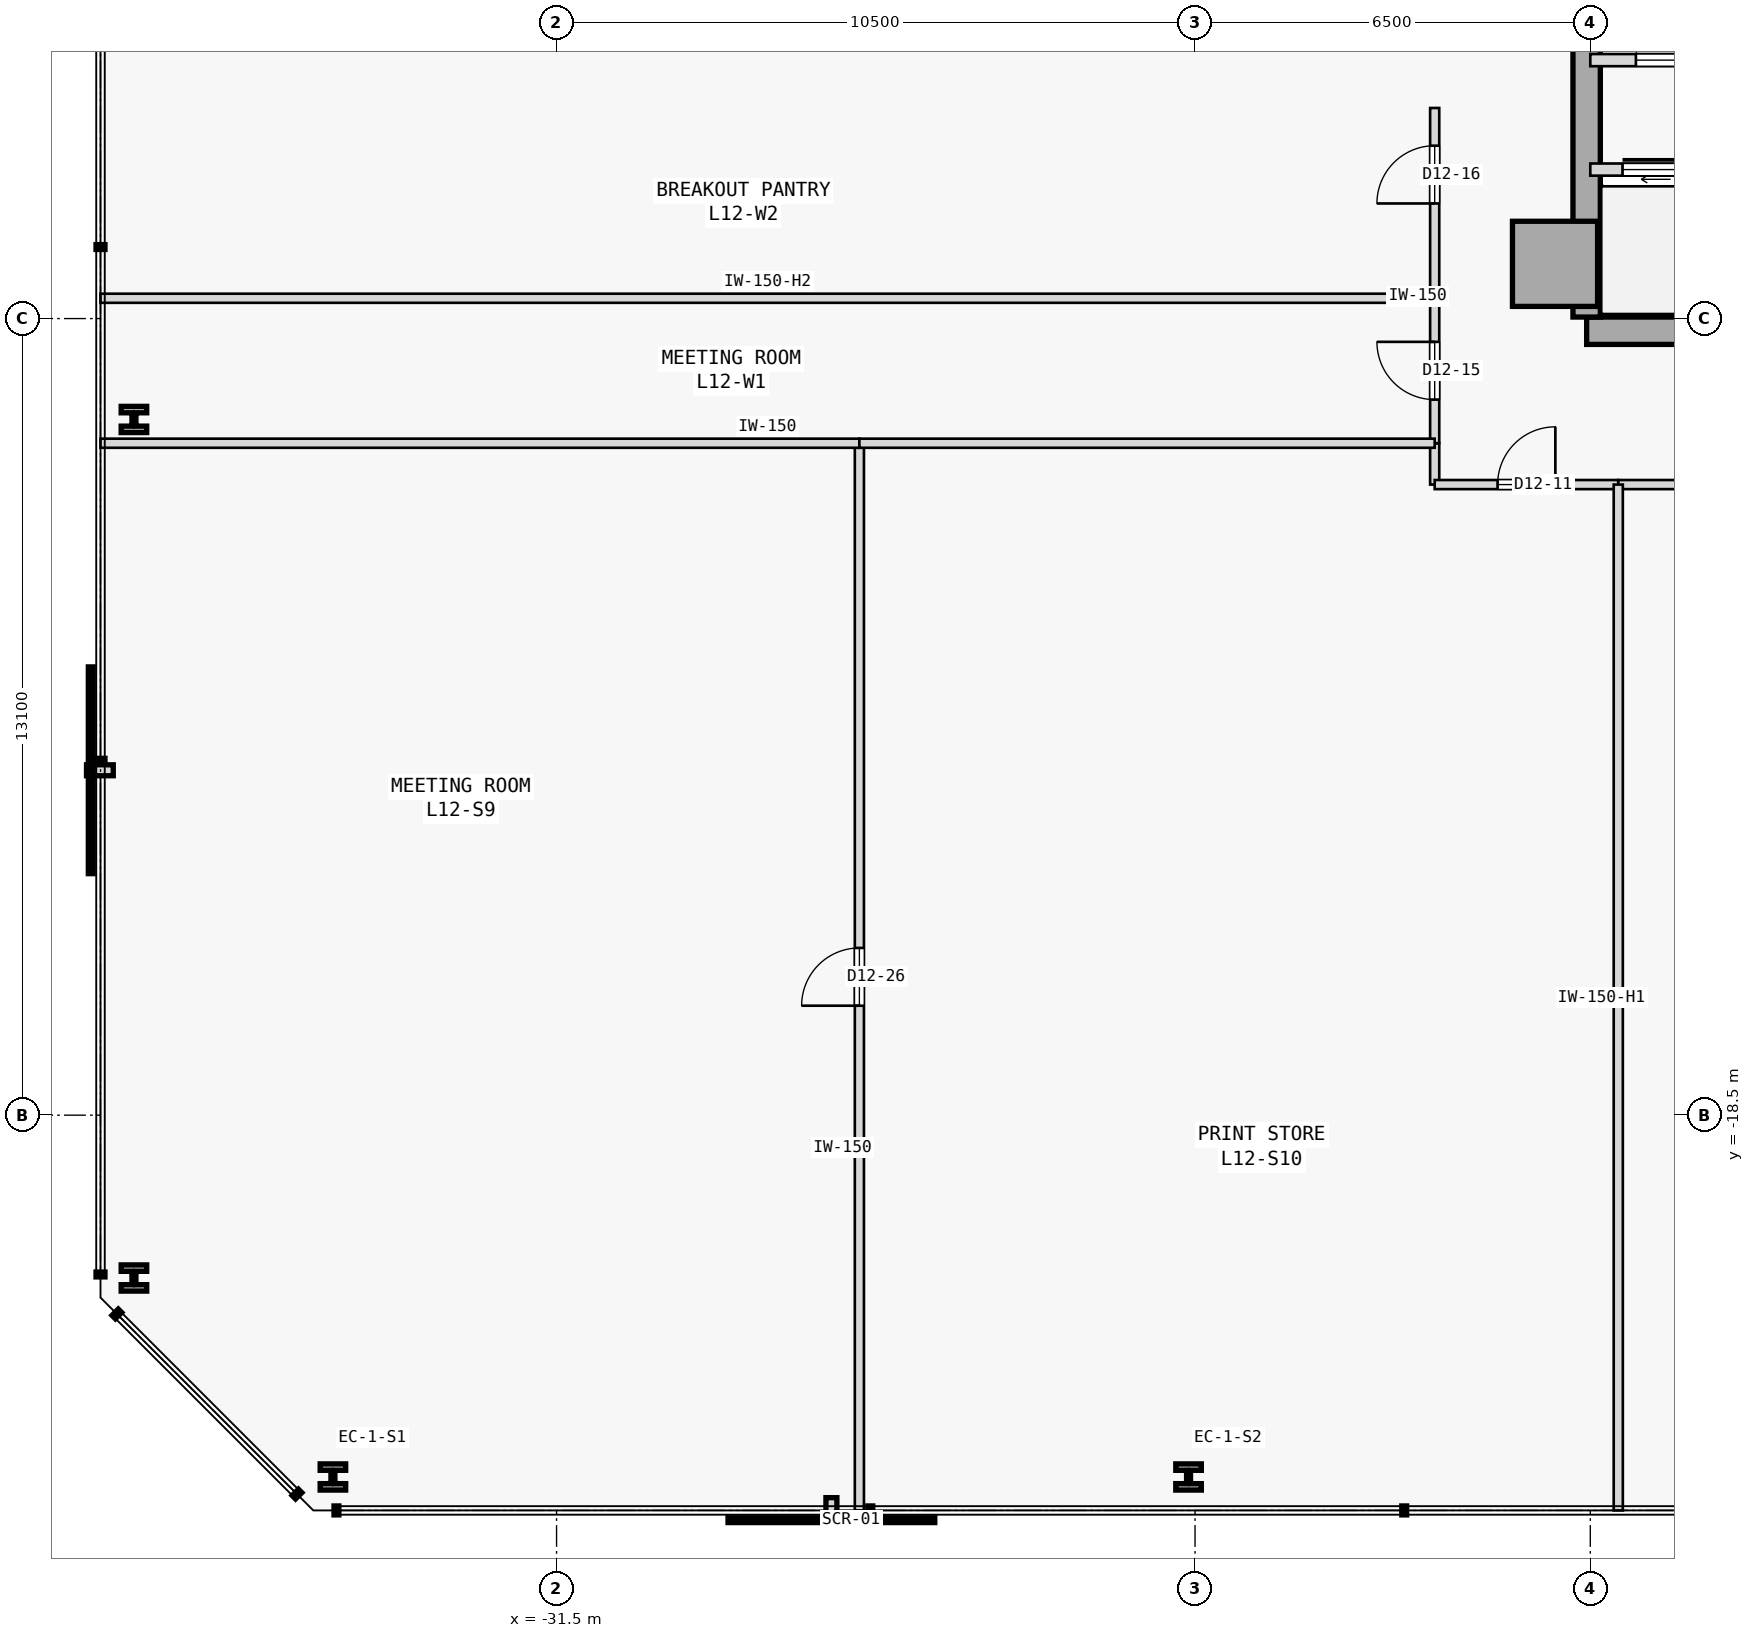
"""IFC4 building model, lengths in metres.
Left out: names, types, materials, properties, quantities, classifications, styles, units other than length and angle.
Written with IfcOpenShell. Run it as: python <this file> out.ifc"""

import sys

from ifc_helpers import new_model, si_unit, direction, frame, frame_2d, origin, origin_2d, place, context, subcontext, project, spatial, rectangle, i_section, extrude, element, fill, save


model = new_model("IFC4")
c1 = context("Model", 3, precision=1e-05, world=origin(), true_north=direction((0.0, 1.0)))
c2 = subcontext(c1, "Body", "Model", "MODEL_VIEW")
j1 = project(units=[si_unit("LENGTHUNIT", "METRE"), si_unit("PLANEANGLEUNIT", "RADIAN")], contexts=[c1])
p1 = place(None, origin())
s1 = spatial("IfcSite", under=j1, at=p1, CompositionType="ELEMENT")
p2 = place(p1, origin())
s2 = spatial("IfcBuilding", under=s1, at=p2, CompositionType="ELEMENT")
p3 = place(p2, frame((0.0, 0.0, 52.2)))
s3 = spatial("IfcBuildingStorey", under=s2, at=p3, CompositionType="ELEMENT", Elevation=52.2)
p4 = place(p3, frame((-15.08, -4.5, 0.0), z_axis=(0.0, 0.0, 1.0), x_axis=(1.0, 0.0, 0.0)))
e1 = element("IfcColumn", 1, at=p4, inside=s3, PredefinedType="COLUMN", context=c2, shape_type="SweptSolid", body=[
    extrude(rectangle(XDim=1.4, YDim=1.4, at=origin_2d()), origin(), (0.0, 0.0, 1.0), 3.8),
])
p5 = place(p3, frame((-14.56, -5.6, 0.0), z_axis=(0.0, 0.0, 1.0), x_axis=(1.0, 0.0, 0.0)))
e2 = element("IfcWall", 2, at=p5, inside=s3, PredefinedType="SHEAR", context=c2, shape_type="SweptSolid", body=[
    extrude(rectangle(XDim=10.86, YDim=0.45, at=frame_2d((5.43, 0.0))), origin(), (0.0, 0.0, 1.0), 3.575),
])
p6 = place(p3, frame((-14.56, -5.375, 0.0), z_axis=(0.0, 0.0, 1.0), x_axis=(0.0, 1.0, 0.0)))
e3 = element("IfcWall", 3, at=p6, inside=s3, PredefinedType="SHEAR", context=c2, shape_type="SweptSolid", body=[
    extrude(rectangle(XDim=10.75, YDim=0.45, at=frame_2d((5.375, 0.0))), origin(), (0.0, 0.0, 1.0), 3.575),
])
for number, where, z_axis, x_axis in (
    (4, (-35.178, -24.45, 0.0), (0.0, 0.0, 1.0), (1.0, 0.0, 0.0)),
    (5, (-21.107, -24.45, 0.0), (0.0, 0.0, 1.0), (1.0, 0.0, 0.0)),
    (6, (-38.45, -7.059, 0.0), (0.0, 0.0, 1.0), (1.0, 0.0, 0.0)),
    (7, (-38.45, -21.178, 0.0), (0.0, 0.0, 1.0), (1.0, 0.0, 0.0)),
):
    element("IfcColumn", number, at=place(p3, frame(where, z_axis=z_axis, x_axis=x_axis)), inside=s3, PredefinedType="COLUMN", context=c2, shape_type="SweptSolid", body=[
        extrude(i_section(OverallWidth=0.42, OverallDepth=0.431, WebThickness=0.065, FlangeThickness=0.106, FilletRadius=0.015, at=origin_2d()), origin(), (0.0, 0.0, 1.0), 3.8),
    ])
p7 = place(p3, frame((-14.5, -1.15, 0.0), z_axis=(0.0, 0.0, 1.0), x_axis=(1.0, 0.0, 0.0)))
e8 = element("IfcWall", 8, at=p7, inside=s3, PredefinedType="STANDARD", context=c2, shape_type="SweptSolid", body=[
    extrude(rectangle(XDim=2.95, YDim=0.2, at=frame_2d((1.475, 0.0))), origin(), (0.0, 0.0, 1.0), 3.575),
])
p8 = place(p7, frame((0.75, 0.0, 0.0)))
e9 = element("IfcOpeningElement", 9, at=p8, cuts=e8, PredefinedType="OPENING", context=c2, shape_type="SweptSolid", body=[
    extrude(rectangle(XDim=1.05, YDim=2.18, at=frame_2d((0.525, 1.09))), frame((0.0, 0.11, 0.0), z_axis=(0.0, -1.0, 0.0), x_axis=(1.0, 0.0, 0.0)), (0.0, 0.0, 1.0), 0.22),
])
p9 = place(p3, frame((-14.5, -2.95, 0.0), z_axis=(0.0, 0.0, 1.0), x_axis=(1.0, 0.0, 0.0)))
e10 = element("IfcWall", 10, at=p9, inside=s3, PredefinedType="STANDARD", context=c2, shape_type="SweptSolid", body=[
    extrude(rectangle(XDim=10.8, YDim=0.2, at=frame_2d((5.4, 0.0))), origin(), (0.0, 0.0, 1.0), 3.575),
])
p10 = place(p9, frame((0.53, 0.0, 0.0)))
e11 = element("IfcOpeningElement", 11, at=p10, cuts=e10, PredefinedType="OPENING", context=c2, shape_type="SweptSolid", body=[
    extrude(rectangle(XDim=1.1, YDim=2.15, at=frame_2d((0.55, 1.075))), frame((0.0, 0.11, 0.0), z_axis=(0.0, -1.0, 0.0), x_axis=(1.0, 0.0, 0.0)), (0.0, 0.0, 1.0), 0.22),
])
p11 = place(p9, frame((2.69, 0.0, 0.0)))
e12 = element("IfcOpeningElement", 12, at=p11, cuts=e10, PredefinedType="OPENING", context=c2, shape_type="SweptSolid", body=[
    extrude(rectangle(XDim=1.1, YDim=2.15, at=frame_2d((0.55, 1.075))), frame((0.0, 0.11, 0.0), z_axis=(0.0, -1.0, 0.0), x_axis=(1.0, 0.0, 0.0)), (0.0, 0.0, 1.0), 0.22),
])
p12 = place(p3, frame((-17.059, -8.13, 0.0), z_axis=(0.0, 0.0, 1.0), x_axis=(0.0, 1.0, 0.0)))
e13 = element("IfcWall", 13, at=p12, inside=s3, PredefinedType="PARTITIONING", context=c2, shape_type="SweptSolid", body=[
    extrude(rectangle(XDim=0.68, YDim=0.15, at=frame_2d((0.34, 0.0))), origin(), (0.0, 0.0, 1.0), 3.575),
])
p13 = place(p3, frame((-17.059, -8.13, 0.0), z_axis=(0.0, 0.0, 1.0), x_axis=(1.0, 0.0, 0.0)))
e14 = element("IfcWall", 14, at=p13, inside=s3, PredefinedType="PARTITIONING", context=c2, shape_type="SweptSolid", body=[
    extrude(rectangle(XDim=3.019, YDim=0.15, at=frame_2d((1.51, 0.0))), origin(), (0.0, 0.0, 1.0), 3.575),
])
p14 = place(p13, frame((1.034, 0.0, 0.0)))
e15 = element("IfcOpeningElement", 15, at=p14, cuts=e14, PredefinedType="OPENING", context=c2, shape_type="SweptSolid", body=[
    extrude(rectangle(XDim=0.95, YDim=2.15, at=frame_2d((0.475, 1.075))), frame((0.0, 0.085, 0.0), z_axis=(0.0, -1.0, 0.0), x_axis=(1.0, 0.0, 0.0)), (0.0, 0.0, 1.0), 0.17),
])
p15 = place(p3, frame((-14.04, -8.13, 0.0), z_axis=(0.0, 0.0, 1.0), x_axis=(1.0, 0.0, 0.0)))
e16 = element("IfcWall", 16, at=p15, inside=s3, PredefinedType="PARTITIONING", context=c2, shape_type="SweptSolid", body=[
    extrude(rectangle(XDim=13.12, YDim=0.15, at=frame_2d((6.56, 0.0))), origin(), (0.0, 0.0, 1.0), 3.575),
])
p16 = place(p3, frame((-17.059, -7.45, 0.0), z_axis=(0.0, 0.0, 1.0), x_axis=(0.0, 1.0, 0.0)))
e17 = element("IfcWall", 17, at=p16, inside=s3, PredefinedType="PARTITIONING", context=c2, shape_type="SweptSolid", body=[
    extrude(rectangle(XDim=2.384, YDim=0.15, at=frame_2d((1.192, 0.0))), origin(), (0.0, 0.0, 1.0), 3.575),
])
p17 = place(p16, frame((0.717, 0.0, 0.0)))
e18 = element("IfcOpeningElement", 18, at=p17, cuts=e17, PredefinedType="OPENING", context=c2, shape_type="SweptSolid", body=[
    extrude(rectangle(XDim=0.95, YDim=2.15, at=frame_2d((0.475, 1.075))), frame((0.0, 0.085, 0.0), z_axis=(0.0, -1.0, 0.0), x_axis=(1.0, 0.0, 0.0)), (0.0, 0.0, 1.0), 0.17),
])
p18 = place(p3, frame((-17.059, -5.066, 0.0), z_axis=(0.0, 0.0, 1.0), x_axis=(0.0, 1.0, 0.0)))
e19 = element("IfcWall", 19, at=p18, inside=s3, PredefinedType="PARTITIONING", context=c2, shape_type="SweptSolid", body=[
    extrude(rectangle(XDim=3.129, YDim=0.15, at=frame_2d((1.564, 0.0))), origin(), (0.0, 0.0, 1.0), 3.575),
])
p19 = place(p18, frame((1.559, 0.0, 0.0)))
e20 = element("IfcOpeningElement", 20, at=p19, cuts=e19, PredefinedType="OPENING", context=c2, shape_type="SweptSolid", body=[
    extrude(rectangle(XDim=0.95, YDim=2.15, at=frame_2d((0.475, 1.075))), frame((0.0, 0.085, 0.0), z_axis=(0.0, -1.0, 0.0), x_axis=(1.0, 0.0, 0.0)), (0.0, 0.0, 1.0), 0.17),
])
p20 = place(p3, frame((-26.52, -25.0, 0.0), z_axis=(0.0, 0.0, 1.0), x_axis=(0.0, 1.0, 0.0)))
e21 = element("IfcWall", 21, at=p20, inside=s3, PredefinedType="PARTITIONING", context=c2, shape_type="SweptSolid", body=[
    extrude(rectangle(XDim=17.55, YDim=0.15, at=frame_2d((8.775, 0.0))), origin(), (0.0, 0.0, 1.0), 3.575),
])
p21 = place(p20, frame((8.3, 0.0, 0.0)))
e22 = element("IfcOpeningElement", 22, at=p21, cuts=e21, PredefinedType="OPENING", context=c2, shape_type="SweptSolid", body=[
    extrude(rectangle(XDim=0.95, YDim=2.15, at=frame_2d((0.475, 1.075))), frame((0.0, 0.085, 0.0), z_axis=(0.0, -1.0, 0.0), x_axis=(1.0, 0.0, 0.0)), (0.0, 0.0, 1.0), 0.17),
])
p22 = place(p3, frame((-39.0, -7.45, 0.0), z_axis=(0.0, 0.0, 1.0), x_axis=(1.0, 0.0, 0.0)))
e23 = element("IfcWall", 23, at=p22, inside=s3, PredefinedType="PARTITIONING", context=c2, shape_type="SweptSolid", body=[
    extrude(rectangle(XDim=12.48, YDim=0.15, at=frame_2d((6.24, 0.0))), origin(), (0.0, 0.0, 1.0), 3.575),
])
p23 = place(p3, frame((-14.04, -25.0, 0.0), z_axis=(0.0, 0.0, 1.0), x_axis=(0.0, 1.0, 0.0)))
e24 = element("IfcWall", 24, at=p23, inside=s3, PredefinedType="PARTITIONING", context=c2, shape_type="SweptSolid", body=[
    extrude(rectangle(XDim=16.87, YDim=0.15, at=frame_2d((8.435, 0.0))), origin(), (0.0, 0.0, 1.0), 3.125),
])
p24 = place(p3, frame((-26.52, -7.45, 0.0), z_axis=(0.0, 0.0, 1.0), x_axis=(1.0, 0.0, 0.0)))
e25 = element("IfcWall", 25, at=p24, inside=s3, PredefinedType="PARTITIONING", context=c2, shape_type="SweptSolid", body=[
    extrude(rectangle(XDim=9.461, YDim=0.15, at=frame_2d((4.73, 0.0))), origin(), (0.0, 0.0, 1.0), 3.575),
])
p25 = place(p3, frame((-39.0, -5.066, 0.0), z_axis=(0.0, 0.0, 1.0), x_axis=(1.0, 0.0, 0.0)))
e26 = element("IfcWall", 26, at=p25, inside=s3, PredefinedType="PARTITIONING", context=c2, shape_type="SweptSolid", body=[
    extrude(rectangle(XDim=21.941, YDim=0.15, at=frame_2d((10.97, 0.0))), origin(), (0.0, 0.0, 1.0), 2.975),
])
p26 = place(p8, origin())
e27 = element("IfcDoor", 27, at=p26, inside=s3, OperationType="SINGLE_SWING_RIGHT", PredefinedType="DOOR", context=c2, shape_type="SweptSolid", body=[
    extrude(rectangle(XDim=1.05, YDim=2.18, at=frame_2d((0.525, 1.09))), frame((0.0, 0.025, 0.0), z_axis=(0.0, -1.0, 0.0), x_axis=(1.0, 0.0, 0.0)), (0.0, 0.0, 1.0), 0.05),
])
fill(e9, e27)
p27 = place(p10, origin())
e28 = element("IfcDoor", 28, at=p27, inside=s3, OperationType="SLIDING_TO_RIGHT", PredefinedType="DOOR", context=c2, shape_type="SweptSolid", body=[
    extrude(rectangle(XDim=1.1, YDim=2.15, at=frame_2d((0.55, 1.075))), frame((0.0, 0.025, 0.0), z_axis=(0.0, -1.0, 0.0), x_axis=(1.0, 0.0, 0.0)), (0.0, 0.0, 1.0), 0.05),
])
fill(e11, e28)
p28 = place(p14, origin())
e29 = element("IfcDoor", 29, at=p28, inside=s3, OperationType="SINGLE_SWING_RIGHT", PredefinedType="DOOR", context=c2, shape_type="SweptSolid", body=[
    extrude(rectangle(XDim=0.95, YDim=2.15, at=frame_2d((0.475, 1.075))), frame((0.0, 0.025, 0.0), z_axis=(0.0, -1.0, 0.0), x_axis=(1.0, 0.0, 0.0)), (0.0, 0.0, 1.0), 0.05),
])
fill(e15, e29)
p29 = place(p17, origin())
e30 = element("IfcDoor", 30, at=p29, inside=s3, OperationType="SINGLE_SWING_RIGHT", PredefinedType="DOOR", context=c2, shape_type="SweptSolid", body=[
    extrude(rectangle(XDim=0.95, YDim=2.15, at=frame_2d((0.475, 1.075))), frame((0.0, 0.025, 0.0), z_axis=(0.0, -1.0, 0.0), x_axis=(1.0, 0.0, 0.0)), (0.0, 0.0, 1.0), 0.05),
])
fill(e18, e30)
p30 = place(p19, origin())
e31 = element("IfcDoor", 31, at=p30, inside=s3, OperationType="SINGLE_SWING_LEFT", PredefinedType="DOOR", context=c2, shape_type="SweptSolid", body=[
    extrude(rectangle(XDim=0.95, YDim=2.15, at=frame_2d((0.475, 1.075))), frame((0.0, 0.025, 0.0), z_axis=(0.0, -1.0, 0.0), x_axis=(1.0, 0.0, 0.0)), (0.0, 0.0, 1.0), 0.05),
])
fill(e20, e31)
p31 = place(p21, origin())
e32 = element("IfcDoor", 32, at=p31, inside=s3, OperationType="SINGLE_SWING_LEFT", PredefinedType="DOOR", context=c2, shape_type="SweptSolid", body=[
    extrude(rectangle(XDim=0.95, YDim=2.15, at=frame_2d((0.475, 1.075))), frame((0.0, 0.025, 0.0), z_axis=(0.0, -1.0, 0.0), x_axis=(1.0, 0.0, 0.0)), (0.0, 0.0, 1.0), 0.05),
])
fill(e22, e32)
save(model, sys.argv[1])
